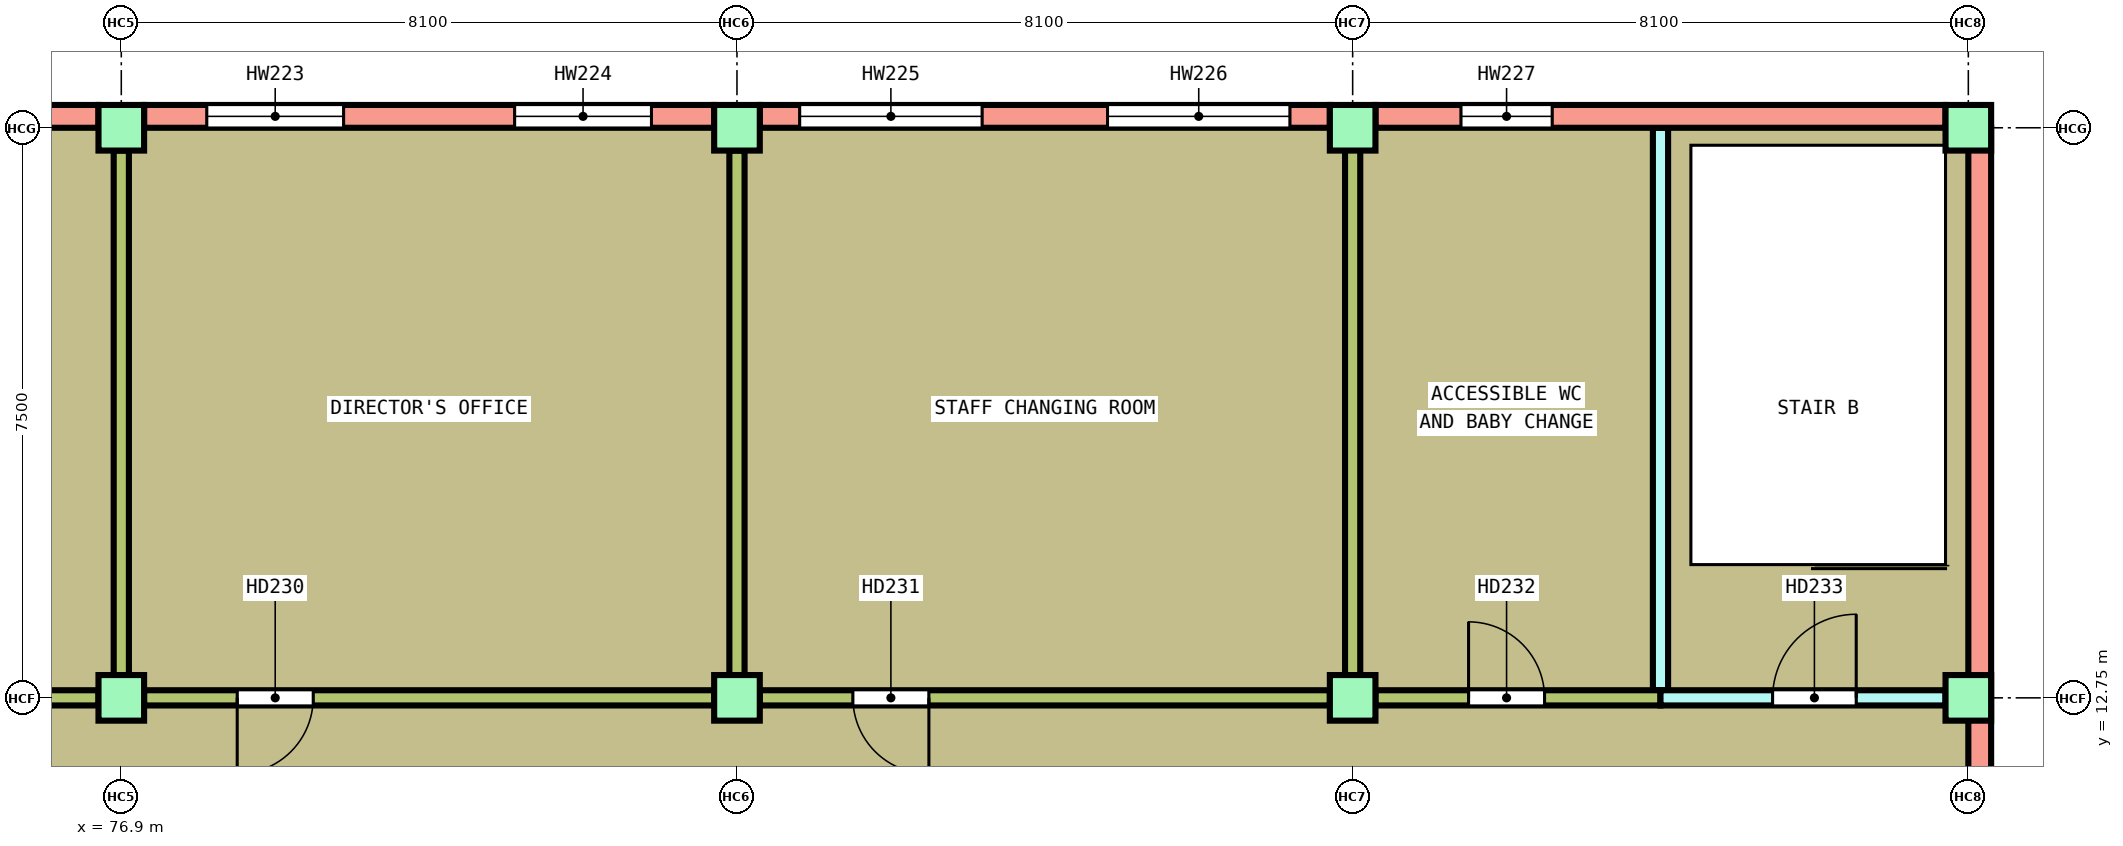
"""IFC4 building model, lengths in metres.
Left out: names, types, materials, properties, quantities, classifications, styles, units other than length and angle.
Written with IfcOpenShell. Run it as: python <this file> out.ifc"""

import sys

from ifc_helpers import new_model, si_unit, direction, frame, frame_2d, origin, origin_2d, place, context, subcontext, project, spatial, rectangle, extrude, element, fill, save


model = new_model("IFC4")
c1 = context("Model", 3, precision=1e-05, world=origin(), true_north=direction((0.0, 1.0)))
c2 = subcontext(c1, "Body", "Model", "MODEL_VIEW")
j1 = project(units=[si_unit("LENGTHUNIT", "METRE"), si_unit("PLANEANGLEUNIT", "RADIAN")], contexts=[c1])
p1 = place(None, origin())
s1 = spatial("IfcSite", under=j1, at=p1, CompositionType="ELEMENT")
p2 = place(p1, origin())
s2 = spatial("IfcBuilding", under=s1, at=p2, CompositionType="ELEMENT")
p3 = place(p2, frame((0.0, 0.0, 10.2)))
s3 = spatial("IfcBuildingStorey", under=s2, at=p3, CompositionType="ELEMENT", Elevation=10.2)
for number, where, z_axis, x_axis in (
    (1, (76.9, 12.75, 0.0), (0.0, 0.0, 1.0), (1.0, 0.0, 0.0)),
    (2, (85.0, 12.75, 0.0), (0.0, 0.0, 1.0), (1.0, 0.0, 0.0)),
    (3, (93.1, 12.75, 0.0), (0.0, 0.0, 1.0), (1.0, 0.0, 0.0)),
    (4, (101.2, 12.75, 0.0), (0.0, 0.0, 1.0), (1.0, 0.0, 0.0)),
    (5, (76.9, 20.25, 0.0), (0.0, 0.0, 1.0), (1.0, 0.0, 0.0)),
    (6, (85.0, 20.25, 0.0), (0.0, 0.0, 1.0), (1.0, 0.0, 0.0)),
    (7, (93.1, 20.25, 0.0), (0.0, 0.0, 1.0), (1.0, 0.0, 0.0)),
    (8, (101.2, 20.25, 0.0), (0.0, 0.0, 1.0), (1.0, 0.0, 0.0)),
):
    element("IfcColumn", number, at=place(p3, frame(where, z_axis=z_axis, x_axis=x_axis)), inside=s3, PredefinedType="COLUMN", context=c2, shape_type="SweptSolid", body=[
        extrude(rectangle(XDim=0.6, YDim=0.6, at=origin_2d()), origin(), (0.0, 0.0, 1.0), 4.15),
    ])
p4 = place(p3, frame((76.9, 13.05, 0.0), z_axis=(0.0, 0.0, 1.0), x_axis=(0.0, 1.0, 0.0)))
e9 = element("IfcWall", 9, at=p4, inside=s3, PredefinedType="PARTITIONING", context=c2, shape_type="SweptSolid", body=[
    extrude(rectangle(XDim=6.9, YDim=0.2, at=frame_2d((3.45, 0.0))), origin(), (0.0, 0.0, 1.0), 3.6),
])
p5 = place(p3, frame((101.35, 20.25, 0.0), z_axis=(0.0, 0.0, 1.0), x_axis=(0.0, -1.0, 0.0)))
e10 = element("IfcWall", 10, at=p5, inside=s3, PredefinedType="SOLIDWALL", context=c2, shape_type="SweptSolid", body=[
    extrude(rectangle(XDim=33.0, YDim=0.3, at=frame_2d((16.5, 0.0))), origin(), (0.0, 0.0, 1.0), 3.6),
])
p6 = place(p5, frame((24.225, 0.0, 0.9)))
e11 = element("IfcOpeningElement", 11, at=p6, cuts=e10, PredefinedType="OPENING", context=c2, shape_type="SweptSolid", body=[
    extrude(rectangle(XDim=1.8, YDim=1.8, at=frame_2d((0.9, 0.9))), frame((0.0, 0.16, 0.0), z_axis=(0.0, -1.0, 0.0), x_axis=(1.0, 0.0, 0.0)), (0.0, 0.0, 1.0), 0.32),
])
p7 = place(p5, frame((14.775, 0.0, 1.5)))
e12 = element("IfcOpeningElement", 12, at=p7, cuts=e10, PredefinedType="OPENING", context=c2, shape_type="SweptSolid", body=[
    extrude(rectangle(XDim=1.2, YDim=0.9, at=frame_2d((0.6, 0.45))), frame((0.0, 0.16, 0.0), z_axis=(0.0, -1.0, 0.0), x_axis=(1.0, 0.0, 0.0)), (0.0, 0.0, 1.0), 0.32),
])
p8 = place(p3, frame((85.0, 13.05, 0.0), z_axis=(0.0, 0.0, 1.0), x_axis=(0.0, 1.0, 0.0)))
e13 = element("IfcWall", 13, at=p8, inside=s3, PredefinedType="PARTITIONING", context=c2, shape_type="SweptSolid", body=[
    extrude(rectangle(XDim=6.9, YDim=0.2, at=frame_2d((3.45, 0.0))), origin(), (0.0, 0.0, 1.0), 3.6),
])
p9 = place(p3, frame((97.15, 12.85, 0.0), z_axis=(0.0, 0.0, 1.0), x_axis=(0.0, 1.0, 0.0)))
e14 = element("IfcWall", 14, at=p9, inside=s3, PredefinedType="SOLIDWALL", context=c2, shape_type="SweptSolid", body=[
    extrude(rectangle(XDim=7.4, YDim=0.2, at=frame_2d((3.7, 0.0))), origin(), (0.0, 0.0, 1.0), 3.6),
])
p10 = place(p3, frame((69.1, 12.75, 0.0), z_axis=(0.0, 0.0, 1.0), x_axis=(1.0, 0.0, 0.0)))
e15 = element("IfcWall", 15, at=p10, inside=s3, PredefinedType="PARTITIONING", context=c2, shape_type="SweptSolid", body=[
    extrude(rectangle(XDim=7.5, YDim=0.2, at=frame_2d((3.75, 0.0))), origin(), (0.0, 0.0, 1.0), 3.6),
])
p11 = place(p10, frame((1.225, 0.0, 0.0)))
e16 = element("IfcOpeningElement", 16, at=p11, cuts=e15, PredefinedType="OPENING", context=c2, shape_type="SweptSolid", body=[
    extrude(rectangle(XDim=1.0, YDim=2.1, at=frame_2d((0.5, 1.05))), frame((0.0, 0.11, 0.0), z_axis=(0.0, -1.0, 0.0), x_axis=(1.0, 0.0, 0.0)), (0.0, 0.0, 1.0), 0.22),
])
p12 = place(p3, frame((77.2, 12.75, 0.0), z_axis=(0.0, 0.0, 1.0), x_axis=(1.0, 0.0, 0.0)))
e17 = element("IfcWall", 17, at=p12, inside=s3, PredefinedType="PARTITIONING", context=c2, shape_type="SweptSolid", body=[
    extrude(rectangle(XDim=7.5, YDim=0.2, at=frame_2d((3.75, 0.0))), origin(), (0.0, 0.0, 1.0), 3.6),
])
p13 = place(p12, frame((1.225, 0.0, 0.0)))
e18 = element("IfcOpeningElement", 18, at=p13, cuts=e17, PredefinedType="OPENING", context=c2, shape_type="SweptSolid", body=[
    extrude(rectangle(XDim=1.0, YDim=2.1, at=frame_2d((0.5, 1.05))), frame((0.0, 0.11, 0.0), z_axis=(0.0, -1.0, 0.0), x_axis=(1.0, 0.0, 0.0)), (0.0, 0.0, 1.0), 0.22),
])
p14 = place(p3, frame((85.3, 12.75, 0.0), z_axis=(0.0, 0.0, 1.0), x_axis=(1.0, 0.0, 0.0)))
e19 = element("IfcWall", 19, at=p14, inside=s3, PredefinedType="PARTITIONING", context=c2, shape_type="SweptSolid", body=[
    extrude(rectangle(XDim=7.5, YDim=0.2, at=frame_2d((3.75, 0.0))), origin(), (0.0, 0.0, 1.0), 3.6),
])
p15 = place(p14, frame((1.225, 0.0, 0.0)))
e20 = element("IfcOpeningElement", 20, at=p15, cuts=e19, PredefinedType="OPENING", context=c2, shape_type="SweptSolid", body=[
    extrude(rectangle(XDim=1.0, YDim=2.1, at=frame_2d((0.5, 1.05))), frame((0.0, 0.11, 0.0), z_axis=(0.0, -1.0, 0.0), x_axis=(1.0, 0.0, 0.0)), (0.0, 0.0, 1.0), 0.22),
])
p16 = place(p3, frame((93.4, 12.75, 0.0), z_axis=(0.0, 0.0, 1.0), x_axis=(1.0, 0.0, 0.0)))
e21 = element("IfcWall", 21, at=p16, inside=s3, PredefinedType="PARTITIONING", context=c2, shape_type="SweptSolid", body=[
    extrude(rectangle(XDim=3.75, YDim=0.2, at=frame_2d((1.875, 0.0))), origin(), (0.0, 0.0, 1.0), 3.6),
])
p17 = place(p16, frame((1.225, 0.0, 0.0)))
e22 = element("IfcOpeningElement", 22, at=p17, cuts=e21, PredefinedType="OPENING", context=c2, shape_type="SweptSolid", body=[
    extrude(rectangle(XDim=1.0, YDim=2.1, at=frame_2d((0.5, 1.05))), frame((0.0, 0.11, 0.0), z_axis=(0.0, -1.0, 0.0), x_axis=(1.0, 0.0, 0.0)), (0.0, 0.0, 1.0), 0.22),
])
p18 = place(p3, frame((97.15, 12.75, 0.0), z_axis=(0.0, 0.0, 1.0), x_axis=(1.0, 0.0, 0.0)))
e23 = element("IfcWall", 23, at=p18, inside=s3, PredefinedType="SOLIDWALL", context=c2, shape_type="SweptSolid", body=[
    extrude(rectangle(XDim=3.75, YDim=0.2, at=frame_2d((1.875, 0.0))), origin(), (0.0, 0.0, 1.0), 3.6),
])
p19 = place(p18, frame((1.475, 0.0, 0.0)))
e24 = element("IfcOpeningElement", 24, at=p19, cuts=e23, PredefinedType="OPENING", context=c2, shape_type="SweptSolid", body=[
    extrude(rectangle(XDim=1.1, YDim=2.1, at=frame_2d((0.55, 1.05))), frame((0.0, 0.11, 0.0), z_axis=(0.0, -1.0, 0.0), x_axis=(1.0, 0.0, 0.0)), (0.0, 0.0, 1.0), 0.22),
])
p20 = place(p3, frame((69.1, 20.4, 0.0), z_axis=(0.0, 0.0, 1.0), x_axis=(1.0, 0.0, 0.0)))
e25 = element("IfcWall", 25, at=p20, inside=s3, PredefinedType="SOLIDWALL", context=c2, shape_type="SweptSolid", body=[
    extrude(rectangle(XDim=7.5, YDim=0.3, at=frame_2d((3.75, 0.0))), origin(), (0.0, 0.0, 1.0), 3.6),
])
p21 = place(p20, frame((0.825, 0.0, 0.9)))
e26 = element("IfcOpeningElement", 26, at=p21, cuts=e25, PredefinedType="OPENING", context=c2, shape_type="SweptSolid", body=[
    extrude(rectangle(XDim=1.8, YDim=1.8, at=frame_2d((0.9, 0.9))), frame((0.0, 0.16, 0.0), z_axis=(0.0, -1.0, 0.0), x_axis=(1.0, 0.0, 0.0)), (0.0, 0.0, 1.0), 0.32),
])
p22 = place(p20, frame((4.875, 0.0, 0.9)))
e27 = element("IfcOpeningElement", 27, at=p22, cuts=e25, PredefinedType="OPENING", context=c2, shape_type="SweptSolid", body=[
    extrude(rectangle(XDim=1.8, YDim=1.8, at=frame_2d((0.9, 0.9))), frame((0.0, 0.16, 0.0), z_axis=(0.0, -1.0, 0.0), x_axis=(1.0, 0.0, 0.0)), (0.0, 0.0, 1.0), 0.32),
])
p23 = place(p3, frame((77.2, 20.4, 0.0), z_axis=(0.0, 0.0, 1.0), x_axis=(1.0, 0.0, 0.0)))
e28 = element("IfcWall", 28, at=p23, inside=s3, PredefinedType="SOLIDWALL", context=c2, shape_type="SweptSolid", body=[
    extrude(rectangle(XDim=7.5, YDim=0.3, at=frame_2d((3.75, 0.0))), origin(), (0.0, 0.0, 1.0), 3.6),
])
p24 = place(p23, frame((0.825, 0.0, 0.9)))
e29 = element("IfcOpeningElement", 29, at=p24, cuts=e28, PredefinedType="OPENING", context=c2, shape_type="SweptSolid", body=[
    extrude(rectangle(XDim=1.8, YDim=1.8, at=frame_2d((0.9, 0.9))), frame((0.0, 0.16, 0.0), z_axis=(0.0, -1.0, 0.0), x_axis=(1.0, 0.0, 0.0)), (0.0, 0.0, 1.0), 0.32),
])
p25 = place(p23, frame((4.875, 0.0, 0.9)))
e30 = element("IfcOpeningElement", 30, at=p25, cuts=e28, PredefinedType="OPENING", context=c2, shape_type="SweptSolid", body=[
    extrude(rectangle(XDim=1.8, YDim=1.8, at=frame_2d((0.9, 0.9))), frame((0.0, 0.16, 0.0), z_axis=(0.0, -1.0, 0.0), x_axis=(1.0, 0.0, 0.0)), (0.0, 0.0, 1.0), 0.32),
])
p26 = place(p3, frame((85.3, 20.4, 0.0), z_axis=(0.0, 0.0, 1.0), x_axis=(1.0, 0.0, 0.0)))
e31 = element("IfcWall", 31, at=p26, inside=s3, PredefinedType="SOLIDWALL", context=c2, shape_type="SweptSolid", body=[
    extrude(rectangle(XDim=7.5, YDim=0.3, at=frame_2d((3.75, 0.0))), origin(), (0.0, 0.0, 1.0), 3.6),
])
p27 = place(p26, frame((0.525, 0.0, 0.3)))
e32 = element("IfcOpeningElement", 32, at=p27, cuts=e31, PredefinedType="OPENING", context=c2, shape_type="SweptSolid", body=[
    extrude(rectangle(XDim=2.4, YDim=2.4, at=frame_2d((1.2, 1.2))), frame((0.0, 0.16, 0.0), z_axis=(0.0, -1.0, 0.0), x_axis=(1.0, 0.0, 0.0)), (0.0, 0.0, 1.0), 0.32),
])
p28 = place(p26, frame((4.575, 0.0, 0.3)))
e33 = element("IfcOpeningElement", 33, at=p28, cuts=e31, PredefinedType="OPENING", context=c2, shape_type="SweptSolid", body=[
    extrude(rectangle(XDim=2.4, YDim=2.4, at=frame_2d((1.2, 1.2))), frame((0.0, 0.16, 0.0), z_axis=(0.0, -1.0, 0.0), x_axis=(1.0, 0.0, 0.0)), (0.0, 0.0, 1.0), 0.32),
])
p29 = place(p3, frame((93.4, 20.4, 0.0), z_axis=(0.0, 0.0, 1.0), x_axis=(1.0, 0.0, 0.0)))
e34 = element("IfcWall", 34, at=p29, inside=s3, PredefinedType="SOLIDWALL", context=c2, shape_type="SweptSolid", body=[
    extrude(rectangle(XDim=7.5, YDim=0.3, at=frame_2d((3.75, 0.0))), origin(), (0.0, 0.0, 1.0), 3.6),
])
p30 = place(p29, frame((1.125, 0.0, 1.5)))
e35 = element("IfcOpeningElement", 35, at=p30, cuts=e34, PredefinedType="OPENING", context=c2, shape_type="SweptSolid", body=[
    extrude(rectangle(XDim=1.2, YDim=0.9, at=frame_2d((0.6, 0.45))), frame((0.0, 0.16, 0.0), z_axis=(0.0, -1.0, 0.0), x_axis=(1.0, 0.0, 0.0)), (0.0, 0.0, 1.0), 0.32),
])
p31 = place(p3, frame((93.1, 12.75, 0.0), z_axis=(0.0, 0.0, 1.0), x_axis=(0.0, 1.0, 0.0)))
e36 = element("IfcWall", 36, at=p31, inside=s3, PredefinedType="PARTITIONING", context=c2, shape_type="SweptSolid", body=[
    extrude(rectangle(XDim=7.5, YDim=0.2, at=frame_2d((3.75, 0.0))), origin(), (0.0, 0.0, 1.0), 3.6),
])
p32 = place(p13, origin())
e37 = element("IfcDoor", 37, at=p32, inside=s3, OperationType="SINGLE_SWING_RIGHT", PredefinedType="DOOR", context=c2, shape_type="SweptSolid", body=[
    extrude(rectangle(XDim=1.0, YDim=2.1, at=frame_2d((0.5, 1.05))), frame((0.0, 0.025, 0.0), z_axis=(0.0, -1.0, 0.0), x_axis=(1.0, 0.0, 0.0)), (0.0, 0.0, 1.0), 0.05),
])
fill(e18, e37)
p33 = place(p15, origin())
e38 = element("IfcDoor", 38, at=p33, inside=s3, OperationType="SINGLE_SWING_LEFT", PredefinedType="DOOR", context=c2, shape_type="SweptSolid", body=[
    extrude(rectangle(XDim=1.0, YDim=2.1, at=frame_2d((0.5, 1.05))), frame((0.0, 0.025, 0.0), z_axis=(0.0, -1.0, 0.0), x_axis=(1.0, 0.0, 0.0)), (0.0, 0.0, 1.0), 0.05),
])
fill(e20, e38)
p34 = place(p17, origin())
e39 = element("IfcDoor", 39, at=p34, inside=s3, OperationType="SINGLE_SWING_RIGHT", PredefinedType="DOOR", context=c2, shape_type="SweptSolid", body=[
    extrude(rectangle(XDim=1.0, YDim=2.1, at=frame_2d((0.5, 1.05))), frame((0.0, 0.025, 0.0), z_axis=(0.0, -1.0, 0.0), x_axis=(1.0, 0.0, 0.0)), (0.0, 0.0, 1.0), 0.05),
])
fill(e22, e39)
p35 = place(p19, origin())
e40 = element("IfcDoor", 40, at=p35, inside=s3, OperationType="SINGLE_SWING_LEFT", PredefinedType="DOOR", context=c2, shape_type="SweptSolid", body=[
    extrude(rectangle(XDim=1.1, YDim=2.1, at=frame_2d((0.55, 1.05))), frame((0.0, 0.025, 0.0), z_axis=(0.0, -1.0, 0.0), x_axis=(1.0, 0.0, 0.0)), (0.0, 0.0, 1.0), 0.05),
])
fill(e24, e40)
p36 = place(p24, origin())
e41 = element("IfcWindow", 41, at=p36, inside=s3, PartitioningType="SINGLE_PANEL", PredefinedType="WINDOW", context=c2, shape_type="SweptSolid", body=[
    extrude(rectangle(XDim=1.8, YDim=1.8, at=frame_2d((0.9, 0.9))), frame((0.0, 0.03, 0.0), z_axis=(0.0, -1.0, 0.0), x_axis=(1.0, 0.0, 0.0)), (0.0, 0.0, 1.0), 0.06),
])
fill(e29, e41)
p37 = place(p25, origin())
e42 = element("IfcWindow", 42, at=p37, inside=s3, PartitioningType="SINGLE_PANEL", PredefinedType="WINDOW", context=c2, shape_type="SweptSolid", body=[
    extrude(rectangle(XDim=1.8, YDim=1.8, at=frame_2d((0.9, 0.9))), frame((0.0, 0.03, 0.0), z_axis=(0.0, -1.0, 0.0), x_axis=(1.0, 0.0, 0.0)), (0.0, 0.0, 1.0), 0.06),
])
fill(e30, e42)
p38 = place(p27, origin())
e43 = element("IfcWindow", 43, at=p38, inside=s3, PartitioningType="DOUBLE_PANEL_VERTICAL", PredefinedType="WINDOW", context=c2, shape_type="SweptSolid", body=[
    extrude(rectangle(XDim=2.4, YDim=2.4, at=frame_2d((1.2, 1.2))), frame((0.0, 0.03, 0.0), z_axis=(0.0, -1.0, 0.0), x_axis=(1.0, 0.0, 0.0)), (0.0, 0.0, 1.0), 0.06),
])
fill(e32, e43)
p39 = place(p28, origin())
e44 = element("IfcWindow", 44, at=p39, inside=s3, PartitioningType="DOUBLE_PANEL_VERTICAL", PredefinedType="WINDOW", context=c2, shape_type="SweptSolid", body=[
    extrude(rectangle(XDim=2.4, YDim=2.4, at=frame_2d((1.2, 1.2))), frame((0.0, 0.03, 0.0), z_axis=(0.0, -1.0, 0.0), x_axis=(1.0, 0.0, 0.0)), (0.0, 0.0, 1.0), 0.06),
])
fill(e33, e44)
p40 = place(p30, origin())
e45 = element("IfcWindow", 45, at=p40, inside=s3, PartitioningType="SINGLE_PANEL", PredefinedType="WINDOW", context=c2, shape_type="SweptSolid", body=[
    extrude(rectangle(XDim=1.2, YDim=0.9, at=frame_2d((0.6, 0.45))), frame((0.0, 0.03, 0.0), z_axis=(0.0, -1.0, 0.0), x_axis=(1.0, 0.0, 0.0)), (0.0, 0.0, 1.0), 0.06),
])
fill(e35, e45)
save(model, sys.argv[1])
